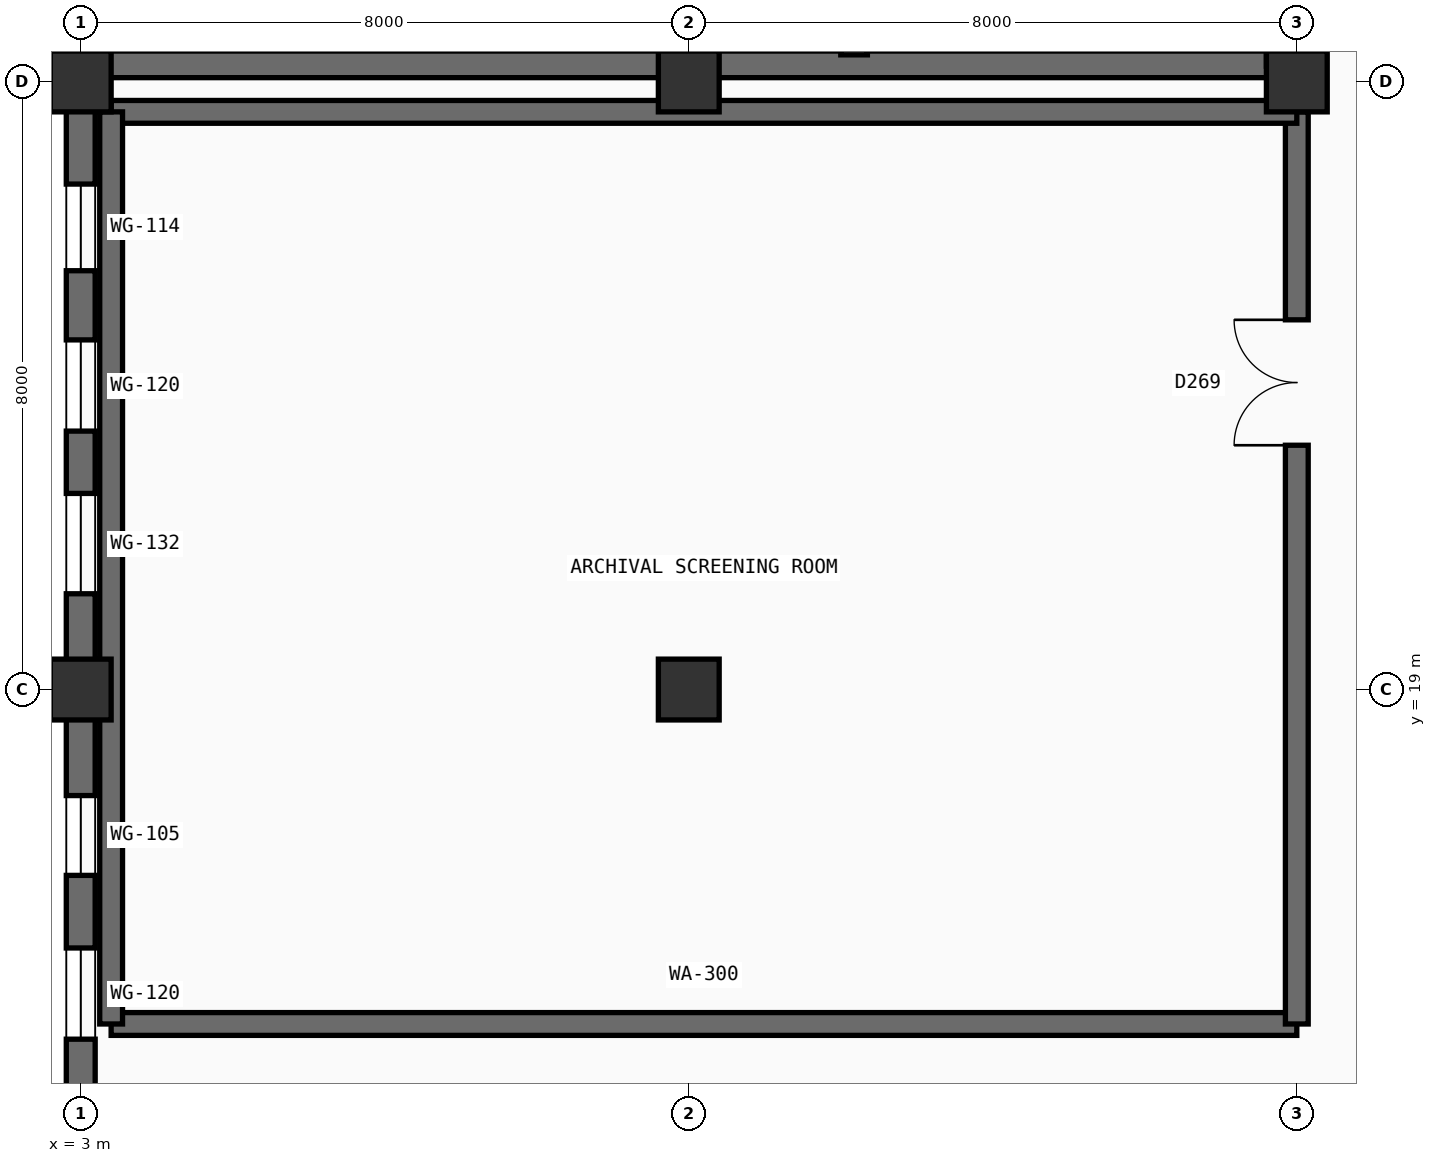
"""IFC4 building model, lengths in metres.
Left out: names, types, materials, properties, quantities, classifications, styles, units other than length and angle.
Written with IfcOpenShell. Run it as: python <this file> out.ifc"""

import sys

from ifc_helpers import new_model, si_unit, direction, frame, frame_2d, origin, origin_2d, place, context, subcontext, project, spatial, rectangle, extrude, element, fill, save


model = new_model("IFC4")
c1 = context("Model", 3, precision=1e-05, world=origin(), true_north=direction((0.0, 1.0)))
c2 = subcontext(c1, "Body", "Model", "MODEL_VIEW")
j1 = project(units=[si_unit("LENGTHUNIT", "METRE"), si_unit("PLANEANGLEUNIT", "RADIAN")], contexts=[c1])
p1 = place(None, origin())
s1 = spatial("IfcSite", under=j1, at=p1, CompositionType="ELEMENT")
p2 = place(p1, origin())
s2 = spatial("IfcBuilding", under=s1, at=p2, CompositionType="ELEMENT")
p3 = place(p2, frame((0.0, 0.0, 9.9)))
s3 = spatial("IfcBuildingStorey", under=s2, at=p3, CompositionType="ELEMENT", Elevation=9.9)
for number, where, z_axis, x_axis in (
    (1, (3.0, 19.0, 0.0), (0.0, 0.0, 1.0), (1.0, 0.0, 0.0)),
    (2, (3.0, 27.0, 0.0), (0.0, 0.0, 1.0), (1.0, 0.0, 0.0)),
    (3, (11.0, 19.0, 0.0), (0.0, 0.0, 1.0), (1.0, 0.0, 0.0)),
    (4, (11.0, 27.0, 0.0), (0.0, 0.0, 1.0), (1.0, 0.0, 0.0)),
    (5, (19.0, 27.0, 0.0), (0.0, 0.0, 1.0), (1.0, 0.0, 0.0)),
):
    element("IfcColumn", number, at=place(p3, frame(where, z_axis=z_axis, x_axis=x_axis)), inside=s3, PredefinedType="COLUMN", context=c2, shape_type="SweptSolid", body=[
        extrude(rectangle(XDim=0.8, YDim=0.8, at=origin_2d()), origin(), (0.0, 0.0, 1.0), 4.5),
    ])
p4 = place(p3, frame((3.0, 11.0, 0.0), z_axis=(0.0, 0.0, 1.0), x_axis=(0.0, 1.0, 0.0)))
e6 = element("IfcWall", 6, at=p4, inside=s3, PredefinedType="SOLIDWALL", context=c2, shape_type="SweptSolid", body=[
    extrude(rectangle(XDim=8.0, YDim=0.38, at=frame_2d((4.0, 0.0))), origin(), (0.0, 0.0, 1.0), 4.5),
])
p5 = place(p4, frame((1.32, 0.0, 1.05)))
e7 = element("IfcOpeningElement", 7, at=p5, cuts=e6, PredefinedType="OPENING", context=c2, shape_type="SweptSolid", body=[
    extrude(rectangle(XDim=1.2, YDim=1.9, at=frame_2d((0.6, 0.95))), frame((0.0, 0.2, 0.0), z_axis=(0.0, -1.0, 0.0), x_axis=(1.0, 0.0, 0.0)), (0.0, 0.0, 1.0), 0.4),
])
p6 = place(p4, frame((3.4, 0.0, 1.05)))
e8 = element("IfcOpeningElement", 8, at=p6, cuts=e6, PredefinedType="OPENING", context=c2, shape_type="SweptSolid", body=[
    extrude(rectangle(XDim=1.2, YDim=1.9, at=frame_2d((0.6, 0.95))), frame((0.0, 0.2, 0.0), z_axis=(0.0, -1.0, 0.0), x_axis=(1.0, 0.0, 0.0)), (0.0, 0.0, 1.0), 0.4),
])
p7 = place(p4, frame((5.555, 0.0, 1.05)))
e9 = element("IfcOpeningElement", 9, at=p7, cuts=e6, PredefinedType="OPENING", context=c2, shape_type="SweptSolid", body=[
    extrude(rectangle(XDim=1.05, YDim=1.7, at=frame_2d((0.525, 0.85))), frame((0.0, 0.2, 0.0), z_axis=(0.0, -1.0, 0.0), x_axis=(1.0, 0.0, 0.0)), (0.0, 0.0, 1.0), 0.4),
])
p8 = place(p3, frame((3.0, 19.0, 0.0), z_axis=(0.0, 0.0, 1.0), x_axis=(0.0, 1.0, 0.0)))
e10 = element("IfcWall", 10, at=p8, inside=s3, PredefinedType="SOLIDWALL", context=c2, shape_type="SweptSolid", body=[
    extrude(rectangle(XDim=8.0, YDim=0.38, at=frame_2d((4.0, 0.0))), origin(), (0.0, 0.0, 1.0), 4.5),
])
p9 = place(p8, frame((1.26, 0.0, 1.05)))
e11 = element("IfcOpeningElement", 11, at=p9, cuts=e10, PredefinedType="OPENING", context=c2, shape_type="SweptSolid", body=[
    extrude(rectangle(XDim=1.32, YDim=2.05, at=frame_2d((0.66, 1.025))), frame((0.0, 0.2, 0.0), z_axis=(0.0, -1.0, 0.0), x_axis=(1.0, 0.0, 0.0)), (0.0, 0.0, 1.0), 0.4),
])
p10 = place(p8, frame((3.4, 0.0, 1.05)))
e12 = element("IfcOpeningElement", 12, at=p10, cuts=e10, PredefinedType="OPENING", context=c2, shape_type="SweptSolid", body=[
    extrude(rectangle(XDim=1.2, YDim=1.9, at=frame_2d((0.6, 0.95))), frame((0.0, 0.2, 0.0), z_axis=(0.0, -1.0, 0.0), x_axis=(1.0, 0.0, 0.0)), (0.0, 0.0, 1.0), 0.4),
])
p11 = place(p8, frame((5.51, 0.0, 1.05)))
e13 = element("IfcOpeningElement", 13, at=p11, cuts=e10, PredefinedType="OPENING", context=c2, shape_type="SweptSolid", body=[
    extrude(rectangle(XDim=1.14, YDim=1.8, at=frame_2d((0.57, 0.9))), frame((0.0, 0.2, 0.0), z_axis=(0.0, -1.0, 0.0), x_axis=(1.0, 0.0, 0.0)), (0.0, 0.0, 1.0), 0.4),
])
p12 = place(p3, frame((3.0, 27.0, 0.0), z_axis=(0.0, 0.0, 1.0), x_axis=(0.0, 1.0, 0.0)))
e14 = element("IfcWall", 14, at=p12, inside=s3, PredefinedType="SOLIDWALL", context=c2, shape_type="SweptSolid", body=[
    extrude(rectangle(XDim=8.0, YDim=0.38, at=frame_2d((4.0, 0.0))), origin(), (0.0, 0.0, 1.0), 4.5),
])
p13 = place(p3, frame((3.2, 27.225, 0.0), z_axis=(0.0, 0.0, 1.0), x_axis=(1.0, 0.0, 0.0)))
e15 = element("IfcWall", 15, at=p13, inside=s3, PredefinedType="SHEAR", context=c2, shape_type="SweptSolid", body=[
    extrude(rectangle(XDim=15.6, YDim=0.35, at=frame_2d((7.8, 0.0))), origin(), (0.0, 0.0, 1.0), 4.2),
])
p14 = place(p3, frame((13.175, 27.35, 0.0), z_axis=(0.0, 0.0, 1.0), x_axis=(0.0, 1.0, 0.0)))
e16 = element("IfcWall", 16, at=p14, inside=s3, PredefinedType="SHEAR", context=c2, shape_type="SweptSolid", body=[
    extrude(rectangle(XDim=4.425, YDim=0.35, at=frame_2d((2.212, 0.0))), origin(), (0.0, 0.0, 1.0), 4.2),
])
p15 = place(p3, frame((18.775, 27.2, 0.0), z_axis=(0.0, 0.0, 1.0), x_axis=(0.0, 1.0, 0.0)))
e17 = element("IfcWall", 17, at=p15, inside=s3, PredefinedType="SHEAR", context=c2, shape_type="SweptSolid", body=[
    extrude(rectangle(XDim=7.6, YDim=0.35, at=frame_2d((3.8, 0.0))), origin(), (0.0, 0.0, 1.0), 4.2),
])
p16 = place(p15, frame((5.1, 0.0, 0.0)))
e18 = element("IfcOpeningElement", 18, at=p16, cuts=e17, PredefinedType="OPENING", context=c2, shape_type="SweptSolid", body=[
    extrude(rectangle(XDim=1.5, YDim=2.2, at=frame_2d((0.75, 1.1))), frame((0.0, 0.185, 0.0), z_axis=(0.0, -1.0, 0.0), x_axis=(1.0, 0.0, 0.0)), (0.0, 0.0, 1.0), 0.37),
])
p17 = place(p3, frame((3.4, 14.6, 0.0), z_axis=(0.0, 0.0, 1.0), x_axis=(1.0, 0.0, 0.0)))
e19 = element("IfcWall", 19, at=p17, inside=s3, PredefinedType="SHEAR", context=c2, shape_type="SweptSolid", body=[
    extrude(rectangle(XDim=15.6, YDim=0.3, at=frame_2d((7.8, 0.0))), origin(), (0.0, 0.0, 1.0), 4.2),
])
p18 = place(p3, frame((19.0, 14.6, 0.0), z_axis=(0.0, 0.0, 1.0), x_axis=(0.0, 1.0, 0.0)))
e20 = element("IfcWall", 20, at=p18, inside=s3, PredefinedType="SHEAR", context=c2, shape_type="SweptSolid", body=[
    extrude(rectangle(XDim=12.0, YDim=0.3, at=frame_2d((6.0, 0.0))), origin(), (0.0, 0.0, 1.0), 4.2),
])
p19 = place(p18, frame((7.614, 0.0, 0.0)))
e21 = element("IfcOpeningElement", 21, at=p19, cuts=e20, PredefinedType="OPENING", context=c2, shape_type="SweptSolid", body=[
    extrude(rectangle(XDim=1.65, YDim=2.25, at=frame_2d((0.825, 1.125))), frame((0.0, 0.16, 0.0), z_axis=(0.0, -1.0, 0.0), x_axis=(1.0, 0.0, 0.0)), (0.0, 0.0, 1.0), 0.32),
])
p20 = place(p3, frame((3.4, 26.6, 0.0), z_axis=(0.0, 0.0, 1.0), x_axis=(1.0, 0.0, 0.0)))
e22 = element("IfcWall", 22, at=p20, inside=s3, PredefinedType="SHEAR", context=c2, shape_type="SweptSolid", body=[
    extrude(rectangle(XDim=15.6, YDim=0.3, at=frame_2d((7.8, 0.0))), origin(), (0.0, 0.0, 1.0), 4.2),
])
p21 = place(p3, frame((3.4, 14.6, 0.0), z_axis=(0.0, 0.0, 1.0), x_axis=(0.0, 1.0, 0.0)))
e23 = element("IfcWall", 23, at=p21, inside=s3, PredefinedType="SHEAR", context=c2, shape_type="SweptSolid", body=[
    extrude(rectangle(XDim=12.0, YDim=0.3, at=frame_2d((6.0, 0.0))), origin(), (0.0, 0.0, 1.0), 4.2),
])
p22 = place(p6, origin())
e24 = element("IfcWindow", 24, at=p22, inside=s3, PartitioningType="SINGLE_PANEL", PredefinedType="WINDOW", context=c2, shape_type="SweptSolid", body=[
    extrude(rectangle(XDim=1.2, YDim=1.9, at=frame_2d((0.6, 0.95))), frame((0.0, 0.03, 0.0), z_axis=(0.0, -1.0, 0.0), x_axis=(1.0, 0.0, 0.0)), (0.0, 0.0, 1.0), 0.06),
])
fill(e8, e24)
p23 = place(p7, origin())
e25 = element("IfcWindow", 25, at=p23, inside=s3, PartitioningType="SINGLE_PANEL", PredefinedType="WINDOW", context=c2, shape_type="SweptSolid", body=[
    extrude(rectangle(XDim=1.05, YDim=1.7, at=frame_2d((0.525, 0.85))), frame((0.0, 0.03, 0.0), z_axis=(0.0, -1.0, 0.0), x_axis=(1.0, 0.0, 0.0)), (0.0, 0.0, 1.0), 0.06),
])
fill(e9, e25)
p24 = place(p9, origin())
e26 = element("IfcWindow", 26, at=p24, inside=s3, PartitioningType="SINGLE_PANEL", PredefinedType="WINDOW", context=c2, shape_type="SweptSolid", body=[
    extrude(rectangle(XDim=1.32, YDim=2.05, at=frame_2d((0.66, 1.025))), frame((0.0, 0.03, 0.0), z_axis=(0.0, -1.0, 0.0), x_axis=(1.0, 0.0, 0.0)), (0.0, 0.0, 1.0), 0.06),
])
fill(e11, e26)
p25 = place(p10, origin())
e27 = element("IfcWindow", 27, at=p25, inside=s3, PartitioningType="SINGLE_PANEL", PredefinedType="WINDOW", context=c2, shape_type="SweptSolid", body=[
    extrude(rectangle(XDim=1.2, YDim=1.9, at=frame_2d((0.6, 0.95))), frame((0.0, 0.03, 0.0), z_axis=(0.0, -1.0, 0.0), x_axis=(1.0, 0.0, 0.0)), (0.0, 0.0, 1.0), 0.06),
])
fill(e12, e27)
p26 = place(p11, origin())
e28 = element("IfcWindow", 28, at=p26, inside=s3, PartitioningType="SINGLE_PANEL", PredefinedType="WINDOW", context=c2, shape_type="SweptSolid", body=[
    extrude(rectangle(XDim=1.14, YDim=1.8, at=frame_2d((0.57, 0.9))), frame((0.0, 0.03, 0.0), z_axis=(0.0, -1.0, 0.0), x_axis=(1.0, 0.0, 0.0)), (0.0, 0.0, 1.0), 0.06),
])
fill(e13, e28)
p27 = place(p19, origin())
e29 = element("IfcDoor", 29, at=p27, inside=s3, OperationType="DOUBLE_DOOR_SINGLE_SWING", PredefinedType="DOOR", context=c2, shape_type="SweptSolid", body=[
    extrude(rectangle(XDim=1.65, YDim=2.25, at=frame_2d((0.825, 1.125))), frame((0.0, 0.025, 0.0), z_axis=(0.0, -1.0, 0.0), x_axis=(1.0, 0.0, 0.0)), (0.0, 0.0, 1.0), 0.05),
])
fill(e21, e29)
save(model, sys.argv[1])
